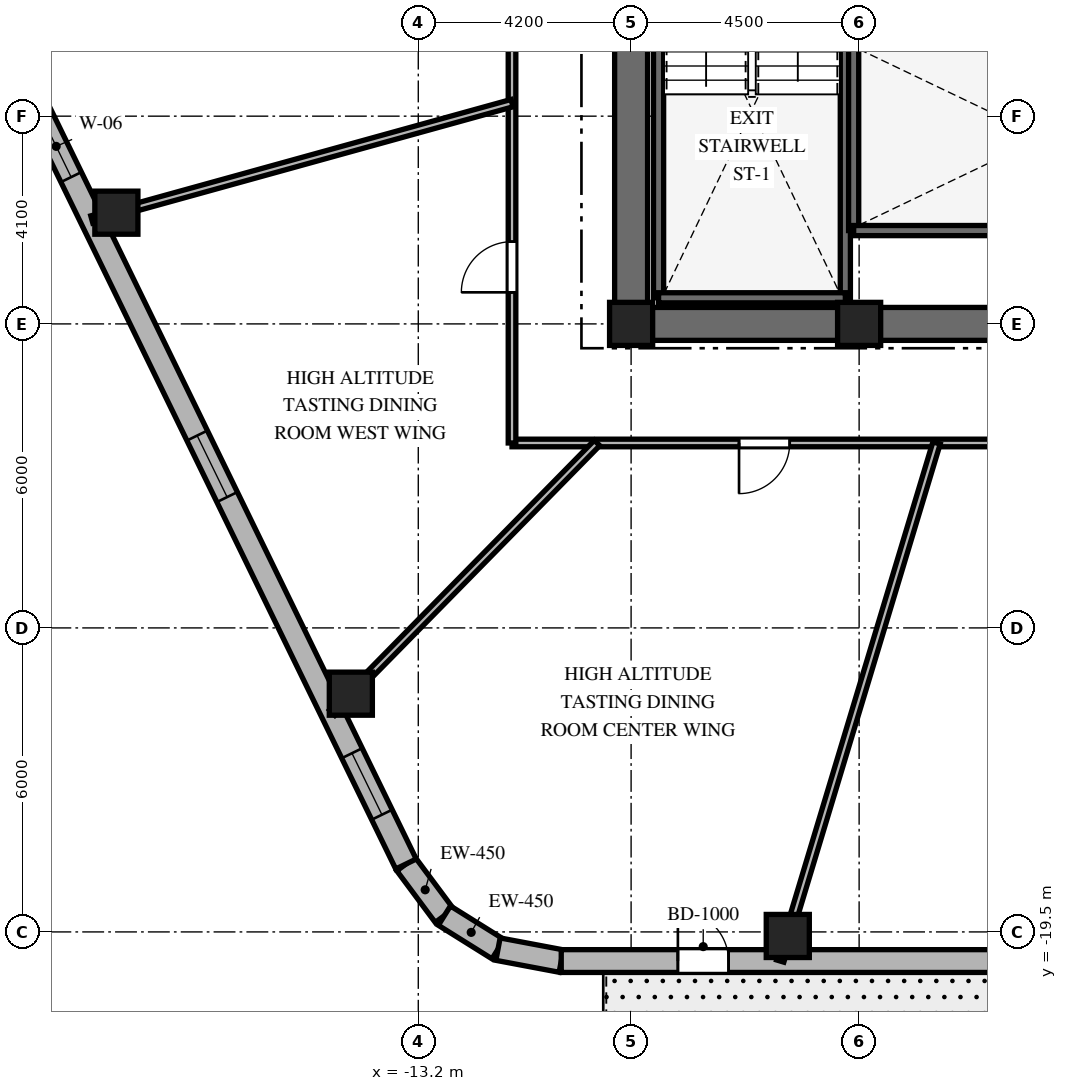
"""IFC4 building model, lengths in metres.
Left out: names, types, materials, properties, quantities, classifications, styles, units other than length and angle.
Written with IfcOpenShell. Run it as: python <this file> out.ifc"""

import sys

from ifc_helpers import new_model, si_unit, direction, frame, frame_2d, origin, origin_2d, place, context, subcontext, project, spatial, rectangle, extrude, element, fill, save


model = new_model("IFC4")
c1 = context("Model", 3, precision=1e-05, world=origin(), true_north=direction((0.0, 1.0)))
c2 = subcontext(c1, "Body", "Model", "MODEL_VIEW")
j1 = project(units=[si_unit("LENGTHUNIT", "METRE"), si_unit("PLANEANGLEUNIT", "RADIAN")], contexts=[c1])
p1 = place(None, origin())
s1 = spatial("IfcSite", under=j1, at=p1, CompositionType="ELEMENT")
p2 = place(p1, origin())
s2 = spatial("IfcBuilding", under=s1, at=p2, CompositionType="ELEMENT")
p3 = place(p2, frame((0.0, 0.0, 288.6)))
s3 = spatial("IfcBuildingStorey", under=s2, at=p3, CompositionType="ELEMENT", Elevation=288.6)
p4 = place(p3, frame((-9.325, -7.5, 0.0), z_axis=(0.0, 0.0, 1.0), x_axis=(1.0, 0.0, 0.0)))
e1 = element("IfcWall", 1, at=p4, inside=s3, PredefinedType="SHEAR", context=c2, shape_type="SweptSolid", body=[
    extrude(rectangle(XDim=18.65, YDim=0.65, at=frame_2d((9.325, 0.0))), origin(), (0.0, 0.0, 1.0), 4.5),
])
p5 = place(p4, frame((9.375, 0.0, 0.0)))
e2 = element("IfcOpeningElement", 2, at=p5, cuts=e1, PredefinedType="OPENING", context=c2, shape_type="SweptSolid", body=[
    extrude(rectangle(XDim=1.0, YDim=2.15, at=frame_2d((0.5, 1.075))), frame((0.0, 0.335, 0.0), z_axis=(0.0, -1.0, 0.0), x_axis=(1.0, 0.0, 0.0)), (0.0, 0.0, 1.0), 0.67),
])
p6 = place(p3, frame((-9.0, -7.175, 0.0), z_axis=(0.0, 0.0, 1.0), x_axis=(0.0, 1.0, 0.0)))
e3 = element("IfcWall", 3, at=p6, inside=s3, PredefinedType="SHEAR", context=c2, shape_type="SweptSolid", body=[
    extrude(rectangle(XDim=14.35, YDim=0.65, at=frame_2d((7.175, 0.0))), origin(), (0.0, 0.0, 1.0), 4.5),
])
p7 = place(p6, frame((10.3, 0.0, 0.0)))
e4 = element("IfcOpeningElement", 4, at=p7, cuts=e3, PredefinedType="OPENING", context=c2, shape_type="SweptSolid", body=[
    extrude(rectangle(XDim=1.05, YDim=2.15, at=frame_2d((0.525, 1.075))), frame((0.0, 0.335, 0.0), z_axis=(0.0, -1.0, 0.0), x_axis=(1.0, 0.0, 0.0)), (0.0, 0.0, 1.0), 0.67),
])
for number, where, z_axis, x_axis in (
    (5, (-8.458, -6.985, 0.0), (0.0, 0.0, 1.0), (0.0, 1.0, 0.0)),
    (6, (-4.772, -6.985, 0.0), (0.0, 0.0, 1.0), (0.0, 1.0, 0.0)),
):
    element("IfcWall", number, at=place(p3, frame(where, z_axis=z_axis, x_axis=x_axis)), inside=s3, PredefinedType="SHEAR", context=c2, shape_type="SweptSolid", body=[
        extrude(rectangle(XDim=9.143, YDim=0.2, at=frame_2d((4.572, 0.0))), origin(), (0.0, 0.0, 1.0), 4.5),
    ])
for number, where, z_axis, x_axis in (
    (7, (-8.458, -6.985, 0.0), (0.0, 0.0, 1.0), (1.0, 0.0, 0.0)),
    (8, (-4.608, -5.658, 0.0), (0.0, 0.0, 1.0), (0.0, 1.0, 0.0)),
):
    element("IfcWall", number, at=place(p3, frame(where, z_axis=z_axis, x_axis=x_axis)), inside=s3, PredefinedType="SHEAR", context=c2, shape_type="SweptSolid", body=[
        extrude(rectangle(XDim=3.686, YDim=0.2, at=frame_2d((1.843, 0.0))), origin(), (0.0, 0.0, 1.0), 4.5),
    ])
p8 = place(p3, frame((-4.608, -5.658, 0.0), z_axis=(0.0, 0.0, 1.0), x_axis=(1.0, 0.0, 0.0)))
e9 = element("IfcWall", 9, at=p8, inside=s3, PredefinedType="SHEAR", context=c2, shape_type="SweptSolid", body=[
    extrude(rectangle(XDim=9.166, YDim=0.2, at=frame_2d((4.583, 0.0))), origin(), (0.0, 0.0, 1.0), 4.5),
])
p9 = place(p8, frame((7.45, 0.0, 0.0)))
e10 = element("IfcOpeningElement", 10, at=p9, cuts=e9, PredefinedType="OPENING", context=c2, shape_type="SweptSolid", body=[
    extrude(rectangle(XDim=1.0, YDim=2.15, at=frame_2d((0.5, 1.075))), frame((0.0, 0.11, 0.0), z_axis=(0.0, -1.0, 0.0), x_axis=(1.0, 0.0, 0.0)), (0.0, 0.0, 1.0), 0.22),
])
for number, where, z_axis, x_axis in (
    (11, (-9.0, -7.5, 0.0), (0.0, 0.0, 1.0), (1.0, 0.0, 0.0)),
    (12, (-4.5, -7.5, 0.0), (0.0, 0.0, 1.0), (1.0, 0.0, 0.0)),
    (13, (-5.908, -19.58, 0.0), (0.0, 0.0, 1.0), (1.0, 0.0, 0.0)),
    (14, (-19.158, -5.305, 0.0), (0.0, 0.0, 1.0), (1.0, 0.0, 0.0)),
    (15, (-14.531, -14.798, 0.0), (0.0, 0.0, 1.0), (1.0, 0.0, 0.0)),
):
    element("IfcColumn", number, at=place(p3, frame(where, z_axis=z_axis, x_axis=x_axis)), inside=s3, PredefinedType="COLUMN", context=c2, shape_type="SweptSolid", body=[
        extrude(rectangle(XDim=0.85, YDim=0.85, at=origin_2d()), origin(), (0.0, 0.0, 1.0), 4.5),
    ])
p10 = place(p3, frame((-13.443, -18.16, 0.0), z_axis=(0.0, 0.0, 1.0), x_axis=(0.597042425808, -0.802209661987, 0.0)))
e16 = element("IfcWall", 16, at=p10, inside=s3, PredefinedType="SOLIDWALL", context=c2, shape_type="SweptSolid", body=[
    extrude(rectangle(XDim=1.27, YDim=0.45, at=frame_2d((0.635, 0.0))), origin(), (0.0, 0.0, 1.0), 4.18),
])
p11 = place(p3, frame((-12.685, -19.178, 0.0), z_axis=(0.0, 0.0, 1.0), x_axis=(0.848031272749, -0.529946186362, 0.0)))
e17 = element("IfcWall", 17, at=p11, inside=s3, PredefinedType="SOLIDWALL", context=c2, shape_type="SweptSolid", body=[
    extrude(rectangle(XDim=1.248, YDim=0.45, at=frame_2d((0.624, 0.0))), origin(), (0.0, 0.0, 1.0), 4.18),
])
p12 = place(p3, frame((-11.626, -19.84, 0.0), z_axis=(0.0, 0.0, 1.0), x_axis=(0.982701956681, -0.185194126083, 0.0)))
e18 = element("IfcWall", 18, at=p12, inside=s3, PredefinedType="SOLIDWALL", context=c2, shape_type="SweptSolid", body=[
    extrude(rectangle(XDim=1.27, YDim=0.45, at=frame_2d((0.635, 0.0))), origin(), (0.0, 0.0, 1.0), 4.18),
])
p13 = place(p3, frame((-10.379, -20.075, 0.0), z_axis=(0.0, 0.0, 1.0), x_axis=(1.0, 0.0, 0.0)))
e19 = element("IfcWall", 19, at=p13, inside=s3, PredefinedType="SOLIDWALL", context=c2, shape_type="SweptSolid", body=[
    extrude(rectangle(XDim=22.417, YDim=0.45, at=frame_2d((11.208, 0.0))), origin(), (0.0, 0.0, 1.0), 4.18),
])
p14 = place(p13, frame((2.302, 0.0, 0.0)))
e20 = element("IfcOpeningElement", 20, at=p14, cuts=e19, PredefinedType="OPENING", context=c2, shape_type="SweptSolid", body=[
    extrude(rectangle(XDim=1.0, YDim=2.15, at=frame_2d((0.5, 1.075))), frame((0.0, 0.235, 0.0), z_axis=(0.0, -1.0, 0.0), x_axis=(1.0, 0.0, 0.0)), (0.0, 0.0, 1.0), 0.47),
])
p15 = place(p13, frame((10.534, 0.0, 0.8)))
e21 = element("IfcOpeningElement", 21, at=p15, cuts=e19, PredefinedType="OPENING", context=c2, shape_type="SweptSolid", body=[
    extrude(rectangle(XDim=1.35, YDim=1.75, at=frame_2d((0.675, 0.875))), frame((0.0, 0.235, 0.0), z_axis=(0.0, -1.0, 0.0), x_axis=(1.0, 0.0, 0.0)), (0.0, 0.0, 1.0), 0.47),
])
p16 = place(p13, frame((19.587, 0.0, 0.8)))
e22 = element("IfcOpeningElement", 22, at=p16, cuts=e19, PredefinedType="OPENING", context=c2, shape_type="SweptSolid", body=[
    extrude(rectangle(XDim=1.35, YDim=1.75, at=frame_2d((0.675, 0.875))), frame((0.0, 0.235, 0.0), z_axis=(0.0, -1.0, 0.0), x_axis=(1.0, 0.0, 0.0)), (0.0, 0.0, 1.0), 0.47),
])
p17 = place(p3, frame((-21.138, -2.371, 0.0), z_axis=(0.0, 0.0, 1.0), x_axis=(0.438128124058, -0.89891253574, 0.0)))
e23 = element("IfcWall", 23, at=p17, inside=s3, PredefinedType="SOLIDWALL", context=c2, shape_type="SweptSolid", body=[
    extrude(rectangle(XDim=17.565, YDim=0.45, at=frame_2d((8.782, 0.0))), origin(), (0.0, 0.0, 1.0), 4.18),
])
p18 = place(p17, frame((1.133, 0.0, 0.8)))
e24 = element("IfcOpeningElement", 24, at=p18, cuts=e23, PredefinedType="OPENING", context=c2, shape_type="SweptSolid", body=[
    extrude(rectangle(XDim=1.35, YDim=1.75, at=frame_2d((0.675, 0.875))), frame((0.0, 0.235, 0.0), z_axis=(0.0, -1.0, 0.0), x_axis=(1.0, 0.0, 0.0)), (0.0, 0.0, 1.0), 0.47),
])
p19 = place(p17, frame((8.158, 0.0, 0.8)))
e25 = element("IfcOpeningElement", 25, at=p19, cuts=e23, PredefinedType="OPENING", context=c2, shape_type="SweptSolid", body=[
    extrude(rectangle(XDim=1.35, YDim=1.75, at=frame_2d((0.675, 0.875))), frame((0.0, 0.235, 0.0), z_axis=(0.0, -1.0, 0.0), x_axis=(1.0, 0.0, 0.0)), (0.0, 0.0, 1.0), 0.47),
])
p20 = place(p17, frame((15.132, 0.0, 0.8)))
e26 = element("IfcOpeningElement", 26, at=p20, cuts=e23, PredefinedType="OPENING", context=c2, shape_type="SweptSolid", body=[
    extrude(rectangle(XDim=1.35, YDim=1.75, at=frame_2d((0.675, 0.875))), frame((0.0, 0.235, 0.0), z_axis=(0.0, -1.0, 0.0), x_axis=(1.0, 0.0, 0.0)), (0.0, 0.0, 1.0), 0.47),
])
p21 = place(p3, frame((11.35, -9.85, 0.0), z_axis=(0.0, 0.0, 1.0), x_axis=(-1.0, 0.0, 0.0)))
e27 = element("IfcWall", 27, at=p21, inside=s3, PredefinedType="PARTITIONING", context=c2, shape_type="SweptSolid", body=[
    extrude(rectangle(XDim=22.7, YDim=0.15, at=frame_2d((11.35, 0.0))), origin(), (0.0, 0.0, 1.0), 3.67),
])
p22 = place(p21, frame((17.22, 0.0, 0.0)))
e28 = element("IfcOpeningElement", 28, at=p22, cuts=e27, PredefinedType="OPENING", context=c2, shape_type="SweptSolid", body=[
    extrude(rectangle(XDim=1.0, YDim=2.03, at=frame_2d((0.5, 1.015))), frame((0.0, 0.085, 0.0), z_axis=(0.0, -1.0, 0.0), x_axis=(1.0, 0.0, 0.0)), (0.0, 0.0, 1.0), 0.17),
])
p23 = place(p21, frame((10.429, 0.0, 0.0)))
e29 = element("IfcOpeningElement", 29, at=p23, cuts=e27, PredefinedType="OPENING", context=c2, shape_type="SweptSolid", body=[
    extrude(rectangle(XDim=1.0, YDim=2.03, at=frame_2d((0.5, 1.015))), frame((0.0, 0.085, 0.0), z_axis=(0.0, -1.0, 0.0), x_axis=(1.0, 0.0, 0.0)), (0.0, 0.0, 1.0), 0.17),
])
p24 = place(p21, frame((3.391, 0.0, 0.0)))
e30 = element("IfcOpeningElement", 30, at=p24, cuts=e27, PredefinedType="OPENING", context=c2, shape_type="SweptSolid", body=[
    extrude(rectangle(XDim=1.0, YDim=2.03, at=frame_2d((0.5, 1.015))), frame((0.0, 0.085, 0.0), z_axis=(0.0, -1.0, 0.0), x_axis=(1.0, 0.0, 0.0)), (0.0, 0.0, 1.0), 0.17),
])
p25 = place(p3, frame((-11.35, -9.85, 0.0), z_axis=(0.0, 0.0, 1.0), x_axis=(0.0, 1.0, 0.0)))
e31 = element("IfcWall", 31, at=p25, inside=s3, PredefinedType="PARTITIONING", context=c2, shape_type="SweptSolid", body=[
    extrude(rectangle(XDim=19.7, YDim=0.15, at=frame_2d((9.85, 0.0))), origin(), (0.0, 0.0, 1.0), 3.67),
])
p26 = place(p25, frame((15.189, 0.0, 0.0)))
e32 = element("IfcOpeningElement", 32, at=p26, cuts=e31, PredefinedType="OPENING", context=c2, shape_type="SweptSolid", body=[
    extrude(rectangle(XDim=1.0, YDim=2.03, at=frame_2d((0.5, 1.015))), frame((0.0, 0.085, 0.0), z_axis=(0.0, -1.0, 0.0), x_axis=(1.0, 0.0, 0.0)), (0.0, 0.0, 1.0), 0.17),
])
p27 = place(p25, frame((8.81, 0.0, 0.0)))
e33 = element("IfcOpeningElement", 33, at=p27, cuts=e31, PredefinedType="OPENING", context=c2, shape_type="SweptSolid", body=[
    extrude(rectangle(XDim=1.0, YDim=2.03, at=frame_2d((0.5, 1.015))), frame((0.0, 0.085, 0.0), z_axis=(0.0, -1.0, 0.0), x_axis=(1.0, 0.0, 0.0)), (0.0, 0.0, 1.0), 0.17),
])
p28 = place(p25, frame((2.973, 0.0, 0.0)))
e34 = element("IfcOpeningElement", 34, at=p28, cuts=e31, PredefinedType="OPENING", context=c2, shape_type="SweptSolid", body=[
    extrude(rectangle(XDim=1.0, YDim=2.03, at=frame_2d((0.5, 1.015))), frame((0.0, 0.085, 0.0), z_axis=(0.0, -1.0, 0.0), x_axis=(1.0, 0.0, 0.0)), (0.0, 0.0, 1.0), 0.17),
])
p29 = place(p3, frame((-11.35, -3.143, 0.0), z_axis=(0.0, 0.0, 1.0), x_axis=(-0.963731818141, -0.266872596386, 0.0)))
e35 = element("IfcWall", 35, at=p29, inside=s3, PredefinedType="PARTITIONING", context=c2, shape_type="SweptSolid", body=[
    extrude(rectangle(XDim=8.605, YDim=0.15, at=frame_2d((4.302, 0.0))), origin(), (0.0, 0.0, 1.0), 3.52),
])
p30 = place(p3, frame((-9.672, -9.85, 0.0), z_axis=(0.0, 0.0, 1.0), x_axis=(-0.700629771301, -0.713524998558, 0.0)))
e36 = element("IfcWall", 36, at=p30, inside=s3, PredefinedType="PARTITIONING", context=c2, shape_type="SweptSolid", body=[
    extrude(rectangle(XDim=7.459, YDim=0.15, at=frame_2d((3.73, 0.0))), origin(), (0.0, 0.0, 1.0), 3.52),
])
p31 = place(p3, frame((-2.972, -9.85, 0.0), z_axis=(0.0, 0.0, 1.0), x_axis=(-0.288872169679, -0.957367677324, 0.0)))
e37 = element("IfcWall", 37, at=p31, inside=s3, PredefinedType="PARTITIONING", context=c2, shape_type="SweptSolid", body=[
    extrude(rectangle(XDim=10.68, YDim=0.15, at=frame_2d((5.34, 0.0))), origin(), (0.0, 0.0, 1.0), 3.52),
])
p32 = place(p14, origin())
e38 = element("IfcDoor", 38, at=p32, inside=s3, OperationType="SINGLE_SWING_LEFT", PredefinedType="DOOR", context=c2, shape_type="SweptSolid", body=[
    extrude(rectangle(XDim=1.0, YDim=2.15, at=frame_2d((0.5, 1.075))), frame((0.0, 0.025, 0.0), z_axis=(0.0, -1.0, 0.0), x_axis=(1.0, 0.0, 0.0)), (0.0, 0.0, 1.0), 0.05),
])
fill(e20, e38)
p33 = place(p18, origin())
e39 = element("IfcWindow", 39, at=p33, inside=s3, PartitioningType="SINGLE_PANEL", PredefinedType="WINDOW", context=c2, shape_type="SweptSolid", body=[
    extrude(rectangle(XDim=1.35, YDim=1.75, at=frame_2d((0.675, 0.875))), frame((0.0, 0.03, 0.0), z_axis=(0.0, -1.0, 0.0), x_axis=(1.0, 0.0, 0.0)), (0.0, 0.0, 1.0), 0.06),
])
fill(e24, e39)
p34 = place(p19, origin())
e40 = element("IfcWindow", 40, at=p34, inside=s3, PartitioningType="SINGLE_PANEL", PredefinedType="WINDOW", context=c2, shape_type="SweptSolid", body=[
    extrude(rectangle(XDim=1.35, YDim=1.75, at=frame_2d((0.675, 0.875))), frame((0.0, 0.03, 0.0), z_axis=(0.0, -1.0, 0.0), x_axis=(1.0, 0.0, 0.0)), (0.0, 0.0, 1.0), 0.06),
])
fill(e25, e40)
p35 = place(p20, origin())
e41 = element("IfcWindow", 41, at=p35, inside=s3, PartitioningType="SINGLE_PANEL", PredefinedType="WINDOW", context=c2, shape_type="SweptSolid", body=[
    extrude(rectangle(XDim=1.35, YDim=1.75, at=frame_2d((0.675, 0.875))), frame((0.0, 0.03, 0.0), z_axis=(0.0, -1.0, 0.0), x_axis=(1.0, 0.0, 0.0)), (0.0, 0.0, 1.0), 0.06),
])
fill(e26, e41)
p36 = place(p28, origin())
e42 = element("IfcDoor", 42, at=p36, inside=s3, OperationType="SINGLE_SWING_LEFT", PredefinedType="DOOR", context=c2, shape_type="SweptSolid", body=[
    extrude(rectangle(XDim=1.0, YDim=2.03, at=frame_2d((0.5, 1.015))), frame((0.0, 0.025, 0.0), z_axis=(0.0, -1.0, 0.0), x_axis=(1.0, 0.0, 0.0)), (0.0, 0.0, 1.0), 0.05),
])
fill(e34, e42)
p37 = place(p22, origin())
e43 = element("IfcDoor", 43, at=p37, inside=s3, OperationType="SINGLE_SWING_RIGHT", PredefinedType="DOOR", context=c2, shape_type="SweptSolid", body=[
    extrude(rectangle(XDim=1.0, YDim=2.03, at=frame_2d((0.5, 1.015))), frame((0.0, 0.025, 0.0), z_axis=(0.0, -1.0, 0.0), x_axis=(1.0, 0.0, 0.0)), (0.0, 0.0, 1.0), 0.05),
])
fill(e28, e43)
save(model, sys.argv[1])
